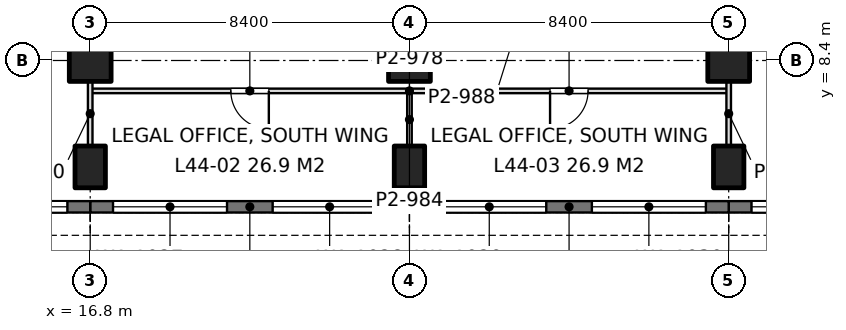
"""IFC4 building model, lengths in metres.
Left out: names, types, materials, properties, quantities, classifications, styles, units other than length and angle.
Written with IfcOpenShell. Run it as: python <this file> out.ifc"""

import sys

from ifc_helpers import new_model, si_unit, direction, frame, frame_2d, origin, origin_2d, place, context, subcontext, project, spatial, rectangle, extrude, element, fill, save


model = new_model("IFC4")
c1 = context("Model", 3, precision=1e-05, world=origin(), true_north=direction((0.0, 1.0)))
c2 = subcontext(c1, "Body", "Model", "MODEL_VIEW")
j1 = project(units=[si_unit("LENGTHUNIT", "METRE"), si_unit("PLANEANGLEUNIT", "RADIAN")], contexts=[c1])
p1 = place(None, origin())
s1 = spatial("IfcSite", under=j1, at=p1, CompositionType="ELEMENT")
p2 = place(p1, origin())
s2 = spatial("IfcBuilding", under=s1, at=p2, CompositionType="ELEMENT")
p3 = place(p2, frame((0.0, 0.0, 194.4)))
s3 = spatial("IfcBuildingStorey", under=s2, at=p3, CompositionType="ELEMENT", Elevation=194.4)
p4 = place(p3, frame((16.8, 5.6, 0.0), z_axis=(0.0, 0.0, 1.0), x_axis=(1.0, 0.0, 0.0)))
e1 = element("IfcColumn", 1, at=p4, inside=s3, PredefinedType="COLUMN", context=c2, shape_type="SweptSolid", body=[
    extrude(rectangle(XDim=0.8, YDim=1.1, at=origin_2d()), origin(), (0.0, 0.0, 1.0), 4.2),
])
p5 = place(p3, frame((16.8, 8.4, 0.0), z_axis=(0.0, 0.0, 1.0), x_axis=(1.0, 0.0, 0.0)))
e2 = element("IfcColumn", 2, at=p5, inside=s3, PredefinedType="COLUMN", context=c2, shape_type="SweptSolid", body=[
    extrude(rectangle(XDim=1.1, YDim=1.1, at=origin_2d()), origin(), (0.0, 0.0, 1.0), 4.2),
])
p6 = place(p3, frame((25.2, 5.6, 0.0), z_axis=(0.0, 0.0, 1.0), x_axis=(1.0, 0.0, 0.0)))
e3 = element("IfcColumn", 3, at=p6, inside=s3, PredefinedType="COLUMN", context=c2, shape_type="SweptSolid", body=[
    extrude(rectangle(XDim=0.8, YDim=1.1, at=origin_2d()), origin(), (0.0, 0.0, 1.0), 4.2),
])
p7 = place(p3, frame((25.2, 8.4, 0.0), z_axis=(0.0, 0.0, 1.0), x_axis=(1.0, 0.0, 0.0)))
e4 = element("IfcColumn", 4, at=p7, inside=s3, PredefinedType="COLUMN", context=c2, shape_type="SweptSolid", body=[
    extrude(rectangle(XDim=1.1, YDim=1.1, at=origin_2d()), origin(), (0.0, 0.0, 1.0), 4.2),
])
p8 = place(p3, frame((33.6, 5.6, 0.0), z_axis=(0.0, 0.0, 1.0), x_axis=(1.0, 0.0, 0.0)))
e5 = element("IfcColumn", 5, at=p8, inside=s3, PredefinedType="COLUMN", context=c2, shape_type="SweptSolid", body=[
    extrude(rectangle(XDim=0.8, YDim=1.1, at=origin_2d()), origin(), (0.0, 0.0, 1.0), 4.2),
])
p9 = place(p3, frame((33.6, 8.4, 0.0), z_axis=(0.0, 0.0, 1.0), x_axis=(1.0, 0.0, 0.0)))
e6 = element("IfcColumn", 6, at=p9, inside=s3, PredefinedType="COLUMN", context=c2, shape_type="SweptSolid", body=[
    extrude(rectangle(XDim=1.1, YDim=1.1, at=origin_2d()), origin(), (0.0, 0.0, 1.0), 4.2),
])
p10 = place(p3, frame((42.0, 4.55, 0.0), z_axis=(0.0, 0.0, 1.0), x_axis=(-1.0, 0.0, 0.0)))
e7 = element("IfcWall", 7, at=p10, inside=s3, PredefinedType="SOLIDWALL", context=c2, shape_type="SweptSolid", body=[
    extrude(rectangle(XDim=8.4, YDim=0.3, at=frame_2d((4.2, 0.0))), origin(), (0.0, 0.0, 1.0), 4.05),
])
p11 = place(p10, frame((0.6, 0.0, 0.9)))
e8 = element("IfcOpeningElement", 8, at=p11, cuts=e7, PredefinedType="OPENING", context=c2, shape_type="SweptSolid", body=[
    extrude(rectangle(XDim=3.0, YDim=1.9, at=frame_2d((1.5, 0.95))), frame((0.0, 0.16, 0.0), z_axis=(0.0, -1.0, 0.0), x_axis=(1.0, 0.0, 0.0)), (0.0, 0.0, 1.0), 0.32),
])
p12 = place(p10, frame((4.8, 0.0, 0.9)))
e9 = element("IfcOpeningElement", 9, at=p12, cuts=e7, PredefinedType="OPENING", context=c2, shape_type="SweptSolid", body=[
    extrude(rectangle(XDim=3.0, YDim=1.9, at=frame_2d((1.5, 0.95))), frame((0.0, 0.16, 0.0), z_axis=(0.0, -1.0, 0.0), x_axis=(1.0, 0.0, 0.0)), (0.0, 0.0, 1.0), 0.32),
])
p13 = place(p3, frame((33.6, 4.55, 0.0), z_axis=(0.0, 0.0, 1.0), x_axis=(-1.0, 0.0, 0.0)))
e10 = element("IfcWall", 10, at=p13, inside=s3, PredefinedType="SOLIDWALL", context=c2, shape_type="SweptSolid", body=[
    extrude(rectangle(XDim=8.4, YDim=0.3, at=frame_2d((4.2, 0.0))), origin(), (0.0, 0.0, 1.0), 4.05),
])
p14 = place(p13, frame((0.6, 0.0, 0.9)))
e11 = element("IfcOpeningElement", 11, at=p14, cuts=e10, PredefinedType="OPENING", context=c2, shape_type="SweptSolid", body=[
    extrude(rectangle(XDim=3.0, YDim=1.9, at=frame_2d((1.5, 0.95))), frame((0.0, 0.16, 0.0), z_axis=(0.0, -1.0, 0.0), x_axis=(1.0, 0.0, 0.0)), (0.0, 0.0, 1.0), 0.32),
])
p15 = place(p13, frame((4.8, 0.0, 0.9)))
e12 = element("IfcOpeningElement", 12, at=p15, cuts=e10, PredefinedType="OPENING", context=c2, shape_type="SweptSolid", body=[
    extrude(rectangle(XDim=3.0, YDim=1.9, at=frame_2d((1.5, 0.95))), frame((0.0, 0.16, 0.0), z_axis=(0.0, -1.0, 0.0), x_axis=(1.0, 0.0, 0.0)), (0.0, 0.0, 1.0), 0.32),
])
p16 = place(p3, frame((25.2, 4.55, 0.0), z_axis=(0.0, 0.0, 1.0), x_axis=(-1.0, 0.0, 0.0)))
e13 = element("IfcWall", 13, at=p16, inside=s3, PredefinedType="SOLIDWALL", context=c2, shape_type="SweptSolid", body=[
    extrude(rectangle(XDim=8.4, YDim=0.3, at=frame_2d((4.2, 0.0))), origin(), (0.0, 0.0, 1.0), 4.05),
])
p17 = place(p16, frame((0.6, 0.0, 0.9)))
e14 = element("IfcOpeningElement", 14, at=p17, cuts=e13, PredefinedType="OPENING", context=c2, shape_type="SweptSolid", body=[
    extrude(rectangle(XDim=3.0, YDim=1.9, at=frame_2d((1.5, 0.95))), frame((0.0, 0.16, 0.0), z_axis=(0.0, -1.0, 0.0), x_axis=(1.0, 0.0, 0.0)), (0.0, 0.0, 1.0), 0.32),
])
p18 = place(p16, frame((4.8, 0.0, 0.9)))
e15 = element("IfcOpeningElement", 15, at=p18, cuts=e13, PredefinedType="OPENING", context=c2, shape_type="SweptSolid", body=[
    extrude(rectangle(XDim=3.0, YDim=1.9, at=frame_2d((1.5, 0.95))), frame((0.0, 0.16, 0.0), z_axis=(0.0, -1.0, 0.0), x_axis=(1.0, 0.0, 0.0)), (0.0, 0.0, 1.0), 0.32),
])
p19 = place(p3, frame((16.8, 4.55, 0.0), z_axis=(0.0, 0.0, 1.0), x_axis=(-1.0, 0.0, 0.0)))
e16 = element("IfcWall", 16, at=p19, inside=s3, PredefinedType="SOLIDWALL", context=c2, shape_type="SweptSolid", body=[
    extrude(rectangle(XDim=8.4, YDim=0.3, at=frame_2d((4.2, 0.0))), origin(), (0.0, 0.0, 1.0), 4.05),
])
p20 = place(p19, frame((0.6, 0.0, 0.9)))
e17 = element("IfcOpeningElement", 17, at=p20, cuts=e16, PredefinedType="OPENING", context=c2, shape_type="SweptSolid", body=[
    extrude(rectangle(XDim=3.0, YDim=1.9, at=frame_2d((1.5, 0.95))), frame((0.0, 0.16, 0.0), z_axis=(0.0, -1.0, 0.0), x_axis=(1.0, 0.0, 0.0)), (0.0, 0.0, 1.0), 0.32),
])
p21 = place(p19, frame((4.8, 0.0, 0.9)))
e18 = element("IfcOpeningElement", 18, at=p21, cuts=e16, PredefinedType="OPENING", context=c2, shape_type="SweptSolid", body=[
    extrude(rectangle(XDim=3.0, YDim=1.9, at=frame_2d((1.5, 0.95))), frame((0.0, 0.16, 0.0), z_axis=(0.0, -1.0, 0.0), x_axis=(1.0, 0.0, 0.0)), (0.0, 0.0, 1.0), 0.32),
])
p22 = place(p3, frame((16.8, 7.6, 0.0), z_axis=(0.0, 0.0, 1.0), x_axis=(1.0, 0.0, 0.0)))
e19 = element("IfcWall", 19, at=p22, inside=s3, PredefinedType="PARTITIONING", context=c2, shape_type="SweptSolid", body=[
    extrude(rectangle(XDim=16.8, YDim=0.12, at=frame_2d((8.4, 0.0))), origin(), (0.0, 0.0, 1.0), 3.69),
])
p23 = place(p22, frame((3.7, 0.0, 0.0)))
e20 = element("IfcOpeningElement", 20, at=p23, cuts=e19, PredefinedType="OPENING", context=c2, shape_type="SweptSolid", body=[
    extrude(rectangle(XDim=1.0, YDim=2.4, at=frame_2d((0.5, 1.2))), frame((0.0, 0.07, 0.0), z_axis=(0.0, -1.0, 0.0), x_axis=(1.0, 0.0, 0.0)), (0.0, 0.0, 1.0), 0.14),
])
p24 = place(p22, frame((12.1, 0.0, 0.0)))
e21 = element("IfcOpeningElement", 21, at=p24, cuts=e19, PredefinedType="OPENING", context=c2, shape_type="SweptSolid", body=[
    extrude(rectangle(XDim=1.0, YDim=2.4, at=frame_2d((0.5, 1.2))), frame((0.0, 0.07, 0.0), z_axis=(0.0, -1.0, 0.0), x_axis=(1.0, 0.0, 0.0)), (0.0, 0.0, 1.0), 0.14),
])
p25 = place(p3, frame((16.8, 6.149, 0.0), z_axis=(0.0, 0.0, 1.0), x_axis=(0.0, 1.0, 0.0)))
e22 = element("IfcWall", 22, at=p25, inside=s3, PredefinedType="PARTITIONING", context=c2, shape_type="SweptSolid", body=[
    extrude(rectangle(XDim=1.703, YDim=0.12, at=frame_2d((0.852, 0.0))), origin(), (0.0, 0.0, 1.0), 3.69),
])
p26 = place(p3, frame((25.2, 6.149, 0.0), z_axis=(0.0, 0.0, 1.0), x_axis=(0.0, 1.0, 0.0)))
e23 = element("IfcWall", 23, at=p26, inside=s3, PredefinedType="PARTITIONING", context=c2, shape_type="SweptSolid", body=[
    extrude(rectangle(XDim=1.393, YDim=0.12, at=frame_2d((0.697, 0.0))), origin(), (0.0, 0.0, 1.0), 3.69),
])
p27 = place(p3, frame((33.6, 6.149, 0.0), z_axis=(0.0, 0.0, 1.0), x_axis=(0.0, 1.0, 0.0)))
e24 = element("IfcWall", 24, at=p27, inside=s3, PredefinedType="PARTITIONING", context=c2, shape_type="SweptSolid", body=[
    extrude(rectangle(XDim=1.703, YDim=0.12, at=frame_2d((0.852, 0.0))), origin(), (0.0, 0.0, 1.0), 3.69),
])
p28 = place(p12, origin())
e25 = element("IfcWindow", 25, at=p28, inside=s3, PartitioningType="SINGLE_PANEL", PredefinedType="WINDOW", context=c2, shape_type="SweptSolid", body=[
    extrude(rectangle(XDim=3.0, YDim=1.9, at=frame_2d((1.5, 0.95))), frame((0.0, 0.03, 0.0), z_axis=(0.0, -1.0, 0.0), x_axis=(1.0, 0.0, 0.0)), (0.0, 0.0, 1.0), 0.06),
])
fill(e9, e25)
p29 = place(p14, origin())
e26 = element("IfcWindow", 26, at=p29, inside=s3, PartitioningType="SINGLE_PANEL", PredefinedType="WINDOW", context=c2, shape_type="SweptSolid", body=[
    extrude(rectangle(XDim=3.0, YDim=1.9, at=frame_2d((1.5, 0.95))), frame((0.0, 0.03, 0.0), z_axis=(0.0, -1.0, 0.0), x_axis=(1.0, 0.0, 0.0)), (0.0, 0.0, 1.0), 0.06),
])
fill(e11, e26)
p30 = place(p15, origin())
e27 = element("IfcWindow", 27, at=p30, inside=s3, PartitioningType="SINGLE_PANEL", PredefinedType="WINDOW", context=c2, shape_type="SweptSolid", body=[
    extrude(rectangle(XDim=3.0, YDim=1.9, at=frame_2d((1.5, 0.95))), frame((0.0, 0.03, 0.0), z_axis=(0.0, -1.0, 0.0), x_axis=(1.0, 0.0, 0.0)), (0.0, 0.0, 1.0), 0.06),
])
fill(e12, e27)
p31 = place(p17, origin())
e28 = element("IfcWindow", 28, at=p31, inside=s3, PartitioningType="SINGLE_PANEL", PredefinedType="WINDOW", context=c2, shape_type="SweptSolid", body=[
    extrude(rectangle(XDim=3.0, YDim=1.9, at=frame_2d((1.5, 0.95))), frame((0.0, 0.03, 0.0), z_axis=(0.0, -1.0, 0.0), x_axis=(1.0, 0.0, 0.0)), (0.0, 0.0, 1.0), 0.06),
])
fill(e14, e28)
p32 = place(p18, origin())
e29 = element("IfcWindow", 29, at=p32, inside=s3, PartitioningType="SINGLE_PANEL", PredefinedType="WINDOW", context=c2, shape_type="SweptSolid", body=[
    extrude(rectangle(XDim=3.0, YDim=1.9, at=frame_2d((1.5, 0.95))), frame((0.0, 0.03, 0.0), z_axis=(0.0, -1.0, 0.0), x_axis=(1.0, 0.0, 0.0)), (0.0, 0.0, 1.0), 0.06),
])
fill(e15, e29)
p33 = place(p20, origin())
e30 = element("IfcWindow", 30, at=p33, inside=s3, PartitioningType="SINGLE_PANEL", PredefinedType="WINDOW", context=c2, shape_type="SweptSolid", body=[
    extrude(rectangle(XDim=3.0, YDim=1.9, at=frame_2d((1.5, 0.95))), frame((0.0, 0.03, 0.0), z_axis=(0.0, -1.0, 0.0), x_axis=(1.0, 0.0, 0.0)), (0.0, 0.0, 1.0), 0.06),
])
fill(e17, e30)
p34 = place(p23, frame((1.0, 0.0, 0.0), z_axis=(0.0, 0.0, 1.0), x_axis=(-1.0, 0.0, 0.0)))
e31 = element("IfcDoor", 31, at=p34, inside=s3, OperationType="SINGLE_SWING_LEFT", PredefinedType="DOOR", context=c2, shape_type="SweptSolid", body=[
    extrude(rectangle(XDim=1.0, YDim=2.4, at=frame_2d((0.5, 1.2))), frame((0.0, 0.025, 0.0), z_axis=(0.0, -1.0, 0.0), x_axis=(1.0, 0.0, 0.0)), (0.0, 0.0, 1.0), 0.05),
])
fill(e20, e31)
p35 = place(p24, frame((1.0, 0.0, 0.0), z_axis=(0.0, 0.0, 1.0), x_axis=(-1.0, 0.0, 0.0)))
e32 = element("IfcDoor", 32, at=p35, inside=s3, OperationType="SINGLE_SWING_RIGHT", PredefinedType="DOOR", context=c2, shape_type="SweptSolid", body=[
    extrude(rectangle(XDim=1.0, YDim=2.4, at=frame_2d((0.5, 1.2))), frame((0.0, 0.025, 0.0), z_axis=(0.0, -1.0, 0.0), x_axis=(1.0, 0.0, 0.0)), (0.0, 0.0, 1.0), 0.05),
])
fill(e21, e32)
save(model, sys.argv[1])
